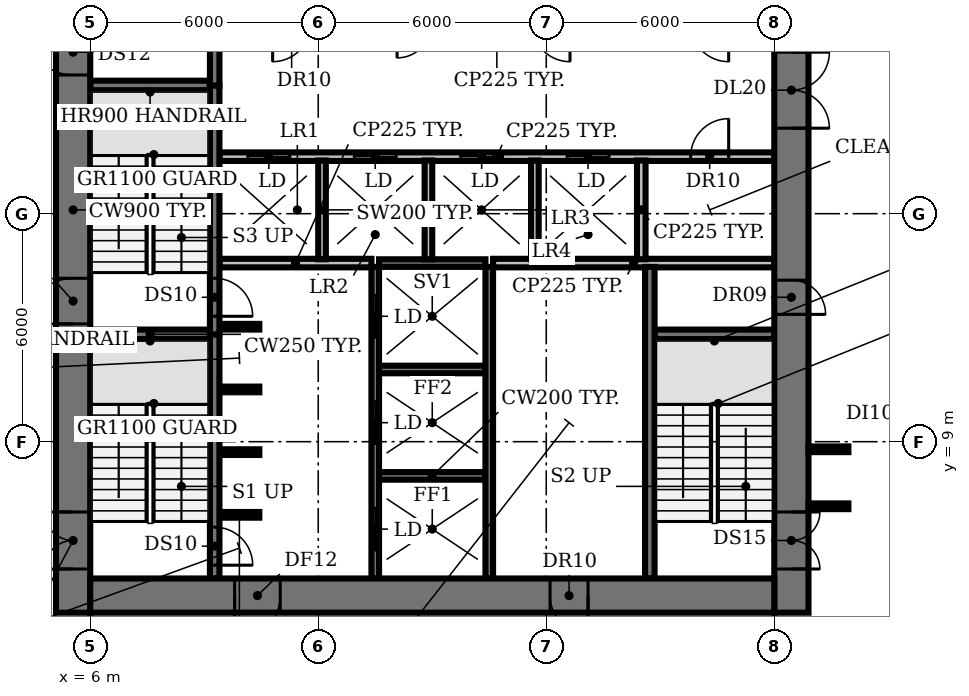
"""IFC4 building model, lengths in metres.
Left out: names, types, materials, properties, quantities, classifications, styles, units other than length and angle.
Written with IfcOpenShell. Run it as: python <this file> out.ifc"""

import sys

from ifc_helpers import new_model, si_unit, direction, frame, frame_2d, origin, place, context, subcontext, project, spatial, rectangle, extrude, element, fill, save


model = new_model("IFC4")
c1 = context("Model", 3, precision=1e-05, world=origin(), true_north=direction((0.0, 1.0)))
c2 = subcontext(c1, "Body", "Model", "MODEL_VIEW")
j1 = project(units=[si_unit("LENGTHUNIT", "METRE"), si_unit("PLANEANGLEUNIT", "RADIAN")], contexts=[c1])
p1 = place(None, origin())
s1 = spatial("IfcSite", under=j1, at=p1, CompositionType="ELEMENT")
p2 = place(p1, origin())
s2 = spatial("IfcBuilding", under=s1, at=p2, CompositionType="ELEMENT")
p3 = place(p2, frame((0.0, 0.0, 50.0)))
s3 = spatial("IfcBuildingStorey", under=s2, at=p3, CompositionType="ELEMENT", Elevation=50.0)
p4 = place(p3, frame((9.4, 7.075, 0.0), z_axis=(0.0, 0.0, 1.0), x_axis=(1.0, 0.0, 0.0)))
e1 = element("IfcWall", 1, at=p4, inside=s3, PredefinedType="SHEAR", context=c2, shape_type="SweptSolid", body=[
    extrude(rectangle(XDim=1.05, YDim=0.15, at=frame_2d((0.525, 0.0))), origin(), (0.0, 0.0, 1.0), 3.85),
])
p5 = place(p3, frame((13.6, 8.1, 0.0), z_axis=(0.0, 0.0, 1.0), x_axis=(1.0, 0.0, 0.0)))
e2 = element("IfcWall", 2, at=p5, inside=s3, PredefinedType="SHEAR", context=c2, shape_type="SweptSolid", body=[
    extrude(rectangle(XDim=2.8, YDim=0.2, at=frame_2d((1.4, 0.0))), origin(), (0.0, 0.0, 1.0), 3.85),
])
for number, where, z_axis, x_axis in (
    (3, (9.4, 8.725, 0.0), (0.0, 0.0, 1.0), (1.0, 0.0, 0.0)),
    (4, (9.4, 10.375, 0.0), (0.0, 0.0, 1.0), (1.0, 0.0, 0.0)),
):
    element("IfcWall", number, at=place(p3, frame(where, z_axis=z_axis, x_axis=x_axis)), inside=s3, PredefinedType="SHEAR", context=c2, shape_type="SweptSolid", body=[
        extrude(rectangle(XDim=1.05, YDim=0.15, at=frame_2d((0.525, 0.0))), origin(), (0.0, 0.0, 1.0), 3.85),
    ])
p6 = place(p3, frame((13.6, 10.9, 0.0), z_axis=(0.0, 0.0, 1.0), x_axis=(1.0, 0.0, 0.0)))
e5 = element("IfcWall", 5, at=p6, inside=s3, PredefinedType="SHEAR", context=c2, shape_type="SweptSolid", body=[
    extrude(rectangle(XDim=2.8, YDim=0.2, at=frame_2d((1.4, 0.0))), origin(), (0.0, 0.0, 1.0), 3.85),
])
for number, where, z_axis, x_axis in (
    (6, (6.0, 11.825, 0.0), (0.0, 0.0, 1.0), (1.0, 0.0, 0.0)),
    (7, (20.85, 11.825, 0.0), (0.0, 0.0, 1.0), (1.0, 0.0, 0.0)),
):
    element("IfcWall", number, at=place(p3, frame(where, z_axis=z_axis, x_axis=x_axis)), inside=s3, PredefinedType="SHEAR", context=c2, shape_type="SweptSolid", body=[
        extrude(rectangle(XDim=3.15, YDim=0.25, at=frame_2d((1.575, 0.0))), origin(), (0.0, 0.0, 1.0), 3.85),
    ])
p7 = place(p3, frame((9.4, 12.025, 0.0), z_axis=(0.0, 0.0, 1.0), x_axis=(1.0, 0.0, 0.0)))
e8 = element("IfcWall", 8, at=p7, inside=s3, PredefinedType="SHEAR", context=c2, shape_type="SweptSolid", body=[
    extrude(rectangle(XDim=1.05, YDim=0.15, at=frame_2d((0.525, 0.0))), origin(), (0.0, 0.0, 1.0), 3.85),
])
p8 = place(p3, frame((9.4, 13.7, 0.0), z_axis=(0.0, 0.0, 1.0), x_axis=(1.0, 0.0, 0.0)))
e9 = element("IfcWall", 9, at=p8, inside=s3, PredefinedType="PARTITIONING", context=c2, shape_type="SweptSolid", body=[
    extrude(rectangle(XDim=4.0, YDim=0.225, at=frame_2d((2.0, 0.0))), origin(), (0.0, 0.0, 1.0), 3.85),
])
p9 = place(p3, frame((13.6, 13.7, 0.0), z_axis=(0.0, 0.0, 1.0), x_axis=(1.0, 0.0, 0.0)))
e10 = element("IfcWall", 10, at=p9, inside=s3, PredefinedType="SHEAR", context=c2, shape_type="SweptSolid", body=[
    extrude(rectangle(XDim=2.8, YDim=0.2, at=frame_2d((1.4, 0.0))), origin(), (0.0, 0.0, 1.0), 3.85),
])
p10 = place(p3, frame((16.6, 13.7, 0.0), z_axis=(0.0, 0.0, 1.0), x_axis=(1.0, 0.0, 0.0)))
e11 = element("IfcWall", 11, at=p10, inside=s3, PredefinedType="PARTITIONING", context=c2, shape_type="SweptSolid", body=[
    extrude(rectangle(XDim=7.4, YDim=0.225, at=frame_2d((3.7, 0.0))), origin(), (0.0, 0.0, 1.0), 3.85),
])
p11 = place(p3, frame((9.4, 16.5, 0.0), z_axis=(0.0, 0.0, 1.0), x_axis=(1.0, 0.0, 0.0)))
e12 = element("IfcWall", 12, at=p11, inside=s3, PredefinedType="PARTITIONING", context=c2, shape_type="SweptSolid", body=[
    extrude(rectangle(XDim=14.6, YDim=0.225, at=frame_2d((7.3, 0.0))), origin(), (0.0, 0.0, 1.0), 3.85),
])
p12 = place(p11, frame((0.75, 0.0, 0.0)))
e13 = element("IfcOpeningElement", 13, at=p12, cuts=e12, PredefinedType="OPENING", context=c2, shape_type="SweptSolid", body=[
    extrude(rectangle(XDim=1.1, YDim=2.1, at=frame_2d((0.55, 1.05))), frame((0.0, 0.123, 0.0), z_axis=(0.0, -1.0, 0.0), x_axis=(1.0, 0.0, 0.0)), (0.0, 0.0, 1.0), 0.245),
])
p13 = place(p11, frame((3.55, 0.0, 0.0)))
e14 = element("IfcOpeningElement", 14, at=p13, cuts=e12, PredefinedType="OPENING", context=c2, shape_type="SweptSolid", body=[
    extrude(rectangle(XDim=1.1, YDim=2.1, at=frame_2d((0.55, 1.05))), frame((0.0, 0.123, 0.0), z_axis=(0.0, -1.0, 0.0), x_axis=(1.0, 0.0, 0.0)), (0.0, 0.0, 1.0), 0.245),
])
p14 = place(p11, frame((6.35, 0.0, 0.0)))
e15 = element("IfcOpeningElement", 15, at=p14, cuts=e12, PredefinedType="OPENING", context=c2, shape_type="SweptSolid", body=[
    extrude(rectangle(XDim=1.1, YDim=2.1, at=frame_2d((0.55, 1.05))), frame((0.0, 0.123, 0.0), z_axis=(0.0, -1.0, 0.0), x_axis=(1.0, 0.0, 0.0)), (0.0, 0.0, 1.0), 0.245),
])
p15 = place(p11, frame((9.15, 0.0, 0.0)))
e16 = element("IfcOpeningElement", 16, at=p15, cuts=e12, PredefinedType="OPENING", context=c2, shape_type="SweptSolid", body=[
    extrude(rectangle(XDim=1.1, YDim=2.1, at=frame_2d((0.55, 1.05))), frame((0.0, 0.123, 0.0), z_axis=(0.0, -1.0, 0.0), x_axis=(1.0, 0.0, 0.0)), (0.0, 0.0, 1.0), 0.245),
])
p16 = place(p11, frame((12.4, 0.0, 0.0)))
e17 = element("IfcOpeningElement", 17, at=p16, cuts=e12, PredefinedType="OPENING", context=c2, shape_type="SweptSolid", body=[
    extrude(rectangle(XDim=1.0, YDim=2.1, at=frame_2d((0.5, 1.05))), frame((0.0, 0.123, 0.0), z_axis=(0.0, -1.0, 0.0), x_axis=(1.0, 0.0, 0.0)), (0.0, 0.0, 1.0), 0.245),
])
p17 = place(p3, frame((6.0, 18.375, 0.0), z_axis=(0.0, 0.0, 1.0), x_axis=(1.0, 0.0, 0.0)))
e18 = element("IfcWall", 18, at=p17, inside=s3, PredefinedType="SHEAR", context=c2, shape_type="SweptSolid", body=[
    extrude(rectangle(XDim=3.15, YDim=0.25, at=frame_2d((1.575, 0.0))), origin(), (0.0, 0.0, 1.0), 3.85),
])
p18 = place(p3, frame((9.275, 11.825, 0.0), z_axis=(0.0, 0.0, 1.0), x_axis=(0.0, -1.0, 0.0)))
e19 = element("IfcWall", 19, at=p18, inside=s3, PredefinedType="SHEAR", context=c2, shape_type="SweptSolid", body=[
    extrude(rectangle(XDim=6.425, YDim=0.25, at=frame_2d((3.212, 0.0))), origin(), (0.0, 0.0, 1.0), 3.85),
])
p19 = place(p18, frame((5.075, 0.0, 0.0)))
e20 = element("IfcOpeningElement", 20, at=p19, cuts=e19, PredefinedType="OPENING", context=c2, shape_type="SweptSolid", body=[
    extrude(rectangle(XDim=1.0, YDim=2.1, at=frame_2d((0.5, 1.05))), frame((0.0, 0.135, 0.0), z_axis=(0.0, -1.0, 0.0), x_axis=(1.0, 0.0, 0.0)), (0.0, 0.0, 1.0), 0.27),
])
p20 = place(p3, frame((9.275, 18.375, 0.0), z_axis=(0.0, 0.0, 1.0), x_axis=(0.0, -1.0, 0.0)))
e21 = element("IfcWall", 21, at=p20, inside=s3, PredefinedType="SHEAR", context=c2, shape_type="SweptSolid", body=[
    extrude(rectangle(XDim=6.55, YDim=0.25, at=frame_2d((3.275, 0.0))), origin(), (0.0, 0.0, 1.0), 3.85),
])
p21 = place(p20, frame((5.075, 0.0, 0.0)))
e22 = element("IfcOpeningElement", 22, at=p21, cuts=e21, PredefinedType="OPENING", context=c2, shape_type="SweptSolid", body=[
    extrude(rectangle(XDim=1.0, YDim=2.1, at=frame_2d((0.5, 1.05))), frame((0.0, 0.135, 0.0), z_axis=(0.0, -1.0, 0.0), x_axis=(1.0, 0.0, 0.0)), (0.0, 0.0, 1.0), 0.27),
])
p22 = place(p3, frame((9.275, 18.375, 0.0), z_axis=(0.0, 0.0, 1.0), x_axis=(0.0, 1.0, 0.0)))
e23 = element("IfcWall", 23, at=p22, inside=s3, PredefinedType="SHEAR", context=c2, shape_type="SweptSolid", body=[
    extrude(rectangle(XDim=6.425, YDim=0.25, at=frame_2d((3.212, 0.0))), origin(), (0.0, 0.0, 1.0), 3.85),
])
p23 = place(p3, frame((12.1, 13.8, 0.0), z_axis=(0.0, 0.0, 1.0), x_axis=(0.0, 1.0, 0.0)))
e24 = element("IfcWall", 24, at=p23, inside=s3, PredefinedType="SOLIDWALL", context=c2, shape_type="SweptSolid", body=[
    extrude(rectangle(XDim=2.6, YDim=0.2, at=frame_2d((1.3, 0.0))), origin(), (0.0, 0.0, 1.0), 3.85),
])
p24 = place(p3, frame((13.5, 5.4, 0.0), z_axis=(0.0, 0.0, 1.0), x_axis=(0.0, 1.0, 0.0)))
e25 = element("IfcWall", 25, at=p24, inside=s3, PredefinedType="SHEAR", context=c2, shape_type="SweptSolid", body=[
    extrude(rectangle(XDim=8.2, YDim=0.2, at=frame_2d((4.1, 0.0))), origin(), (0.0, 0.0, 1.0), 3.85),
])
p25 = place(p24, frame((0.75, 0.0, 0.0)))
e26 = element("IfcOpeningElement", 26, at=p25, cuts=e25, PredefinedType="OPENING", context=c2, shape_type="SweptSolid", body=[
    extrude(rectangle(XDim=1.1, YDim=2.1, at=frame_2d((0.55, 1.05))), frame((0.0, 0.11, 0.0), z_axis=(0.0, -1.0, 0.0), x_axis=(1.0, 0.0, 0.0)), (0.0, 0.0, 1.0), 0.22),
])
p26 = place(p24, frame((3.55, 0.0, 0.0)))
e27 = element("IfcOpeningElement", 27, at=p26, cuts=e25, PredefinedType="OPENING", context=c2, shape_type="SweptSolid", body=[
    extrude(rectangle(XDim=1.1, YDim=2.1, at=frame_2d((0.55, 1.05))), frame((0.0, 0.11, 0.0), z_axis=(0.0, -1.0, 0.0), x_axis=(1.0, 0.0, 0.0)), (0.0, 0.0, 1.0), 0.22),
])
p27 = place(p24, frame((6.35, 0.0, 0.0)))
e28 = element("IfcOpeningElement", 28, at=p27, cuts=e25, PredefinedType="OPENING", context=c2, shape_type="SweptSolid", body=[
    extrude(rectangle(XDim=1.1, YDim=2.1, at=frame_2d((0.55, 1.05))), frame((0.0, 0.11, 0.0), z_axis=(0.0, -1.0, 0.0), x_axis=(1.0, 0.0, 0.0)), (0.0, 0.0, 1.0), 0.22),
])
p28 = place(p3, frame((14.9, 13.8, 0.0), z_axis=(0.0, 0.0, 1.0), x_axis=(0.0, 1.0, 0.0)))
e29 = element("IfcWall", 29, at=p28, inside=s3, PredefinedType="SOLIDWALL", context=c2, shape_type="SweptSolid", body=[
    extrude(rectangle(XDim=2.6, YDim=0.2, at=frame_2d((1.3, 0.0))), origin(), (0.0, 0.0, 1.0), 3.85),
])
p29 = place(p3, frame((16.5, 5.4, 0.0), z_axis=(0.0, 0.0, 1.0), x_axis=(0.0, 1.0, 0.0)))
e30 = element("IfcWall", 30, at=p29, inside=s3, PredefinedType="SHEAR", context=c2, shape_type="SweptSolid", body=[
    extrude(rectangle(XDim=8.2, YDim=0.2, at=frame_2d((4.1, 0.0))), origin(), (0.0, 0.0, 1.0), 3.85),
])
p30 = place(p3, frame((17.7, 13.8, 0.0), z_axis=(0.0, 0.0, 1.0), x_axis=(0.0, 1.0, 0.0)))
e31 = element("IfcWall", 31, at=p30, inside=s3, PredefinedType="SOLIDWALL", context=c2, shape_type="SweptSolid", body=[
    extrude(rectangle(XDim=2.6, YDim=0.2, at=frame_2d((1.3, 0.0))), origin(), (0.0, 0.0, 1.0), 3.85),
])
p31 = place(p3, frame((20.5, 13.8, 0.0), z_axis=(0.0, 0.0, 1.0), x_axis=(0.0, 1.0, 0.0)))
e32 = element("IfcWall", 32, at=p31, inside=s3, PredefinedType="PARTITIONING", context=c2, shape_type="SweptSolid", body=[
    extrude(rectangle(XDim=2.6, YDim=0.225, at=frame_2d((1.3, 0.0))), origin(), (0.0, 0.0, 1.0), 3.85),
])
p32 = place(p3, frame((20.725, 5.4, 0.0), z_axis=(0.0, 0.0, 1.0), x_axis=(0.0, 1.0, 0.0)))
e33 = element("IfcWall", 33, at=p32, inside=s3, PredefinedType="SHEAR", context=c2, shape_type="SweptSolid", body=[
    extrude(rectangle(XDim=8.2, YDim=0.25, at=frame_2d((4.1, 0.0))), origin(), (0.0, 0.0, 1.0), 3.85),
])
p33 = place(p3, frame((5.55, 4.5, 0.0), z_axis=(0.0, 0.0, 1.0), x_axis=(0.0, 1.0, 0.0)))
e34 = element("IfcWall", 34, at=p33, inside=s3, PredefinedType="SHEAR", context=c2, shape_type="SweptSolid", body=[
    extrude(rectangle(XDim=21.2, YDim=0.9, at=frame_2d((10.6, 0.0))), origin(), (0.0, 0.0, 1.0), 3.85),
])
p34 = place(p33, frame((1.15, 0.0, 0.0)))
e35 = element("IfcOpeningElement", 35, at=p34, cuts=e34, PredefinedType="OPENING", context=c2, shape_type="SweptSolid", body=[
    extrude(rectangle(XDim=1.5, YDim=2.1, at=frame_2d((0.75, 1.05))), frame((0.0, 0.46, 0.0), z_axis=(0.0, -1.0, 0.0), x_axis=(1.0, 0.0, 0.0)), (0.0, 0.0, 1.0), 0.92),
])
p35 = place(p33, frame((7.6, 0.0, 0.0)))
e36 = element("IfcOpeningElement", 36, at=p35, cuts=e34, PredefinedType="OPENING", context=c2, shape_type="SweptSolid", body=[
    extrude(rectangle(XDim=1.2, YDim=2.1, at=frame_2d((0.6, 1.05))), frame((0.0, 0.46, 0.0), z_axis=(0.0, -1.0, 0.0), x_axis=(1.0, 0.0, 0.0)), (0.0, 0.0, 1.0), 0.92),
])
p36 = place(p33, frame((14.15, 0.0, 0.0)))
e37 = element("IfcOpeningElement", 37, at=p36, cuts=e34, PredefinedType="OPENING", context=c2, shape_type="SweptSolid", body=[
    extrude(rectangle(XDim=1.2, YDim=2.1, at=frame_2d((0.6, 1.05))), frame((0.0, 0.46, 0.0), z_axis=(0.0, -1.0, 0.0), x_axis=(1.0, 0.0, 0.0)), (0.0, 0.0, 1.0), 0.92),
])
p37 = place(p3, frame((24.45, 25.7, 0.0), z_axis=(0.0, 0.0, 1.0), x_axis=(0.0, -1.0, 0.0)))
e38 = element("IfcWall", 38, at=p37, inside=s3, PredefinedType="SHEAR", context=c2, shape_type="SweptSolid", body=[
    extrude(rectangle(XDim=21.2, YDim=0.9, at=frame_2d((10.6, 0.0))), origin(), (0.0, 0.0, 1.0), 3.85),
])
p38 = place(p37, frame((18.55, 0.0, 0.0)))
e39 = element("IfcOpeningElement", 39, at=p38, cuts=e38, PredefinedType="OPENING", context=c2, shape_type="SweptSolid", body=[
    extrude(rectangle(XDim=1.5, YDim=2.1, at=frame_2d((0.75, 1.05))), frame((0.0, 0.46, 0.0), z_axis=(0.0, -1.0, 0.0), x_axis=(1.0, 0.0, 0.0)), (0.0, 0.0, 1.0), 0.92),
])
p39 = place(p37, frame((12.45, 0.0, 0.0)))
e40 = element("IfcOpeningElement", 40, at=p39, cuts=e38, PredefinedType="OPENING", context=c2, shape_type="SweptSolid", body=[
    extrude(rectangle(XDim=0.9, YDim=2.1, at=frame_2d((0.45, 1.05))), frame((0.0, 0.46, 0.0), z_axis=(0.0, -1.0, 0.0), x_axis=(1.0, 0.0, 0.0)), (0.0, 0.0, 1.0), 0.92),
])
p40 = place(p37, frame((6.45, 0.0, 0.0)))
e41 = element("IfcOpeningElement", 41, at=p40, cuts=e38, PredefinedType="OPENING", context=c2, shape_type="SweptSolid", body=[
    extrude(rectangle(XDim=2.0, YDim=2.1, at=frame_2d((1.0, 1.05))), frame((0.0, 0.46, 0.0), z_axis=(0.0, -1.0, 0.0), x_axis=(1.0, 0.0, 0.0)), (0.0, 0.0, 1.0), 0.92),
])
p41 = place(p3, frame((24.0, 4.95, 0.0), z_axis=(0.0, 0.0, 1.0), x_axis=(-1.0, 0.0, 0.0)))
e42 = element("IfcWall", 42, at=p41, inside=s3, PredefinedType="SHEAR", context=c2, shape_type="SweptSolid", body=[
    extrude(rectangle(XDim=18.0, YDim=0.9, at=frame_2d((9.0, 0.0))), origin(), (0.0, 0.0, 1.0), 3.85),
])
p42 = place(p41, frame((13.0, 0.0, 0.0)))
e43 = element("IfcOpeningElement", 43, at=p42, cuts=e42, PredefinedType="OPENING", context=c2, shape_type="SweptSolid", body=[
    extrude(rectangle(XDim=1.2, YDim=2.1, at=frame_2d((0.6, 1.05))), frame((0.0, 0.46, 0.0), z_axis=(0.0, -1.0, 0.0), x_axis=(1.0, 0.0, 0.0)), (0.0, 0.0, 1.0), 0.92),
])
p43 = place(p41, frame((4.9, 0.0, 0.0)))
e44 = element("IfcOpeningElement", 44, at=p43, cuts=e42, PredefinedType="OPENING", context=c2, shape_type="SweptSolid", body=[
    extrude(rectangle(XDim=1.0, YDim=2.1, at=frame_2d((0.5, 1.05))), frame((0.0, 0.46, 0.0), z_axis=(0.0, -1.0, 0.0), x_axis=(1.0, 0.0, 0.0)), (0.0, 0.0, 1.0), 0.92),
])
for number, where, z_axis, x_axis in (
    (45, (24.9, 7.3, 0.0), (0.0, 0.0, 1.0), (1.0, 0.0, 0.0)),
    (46, (24.9, 8.8, 0.0), (0.0, 0.0, 1.0), (1.0, 0.0, 0.0)),
):
    element("IfcWall", number, at=place(p3, frame(where, z_axis=z_axis, x_axis=x_axis)), inside=s3, PredefinedType="PARTITIONING", context=c2, shape_type="SweptSolid", body=[
        extrude(rectangle(XDim=1.05, YDim=0.15, at=frame_2d((0.525, 0.0))), origin(), (0.0, 0.0, 1.0), 2.83),
    ])
p44 = place(p12, origin())
e47 = element("IfcDoor", 47, at=p44, inside=s3, OperationType="DOUBLE_DOOR_SLIDING", PredefinedType="DOOR", context=c2, shape_type="SweptSolid", body=[
    extrude(rectangle(XDim=1.1, YDim=2.1, at=frame_2d((0.55, 1.05))), frame((0.0, 0.025, 0.0), z_axis=(0.0, -1.0, 0.0), x_axis=(1.0, 0.0, 0.0)), (0.0, 0.0, 1.0), 0.05),
])
fill(e13, e47)
p45 = place(p13, origin())
e48 = element("IfcDoor", 48, at=p45, inside=s3, OperationType="DOUBLE_DOOR_SLIDING", PredefinedType="DOOR", context=c2, shape_type="SweptSolid", body=[
    extrude(rectangle(XDim=1.1, YDim=2.1, at=frame_2d((0.55, 1.05))), frame((0.0, 0.025, 0.0), z_axis=(0.0, -1.0, 0.0), x_axis=(1.0, 0.0, 0.0)), (0.0, 0.0, 1.0), 0.05),
])
fill(e14, e48)
p46 = place(p14, origin())
e49 = element("IfcDoor", 49, at=p46, inside=s3, OperationType="DOUBLE_DOOR_SLIDING", PredefinedType="DOOR", context=c2, shape_type="SweptSolid", body=[
    extrude(rectangle(XDim=1.1, YDim=2.1, at=frame_2d((0.55, 1.05))), frame((0.0, 0.025, 0.0), z_axis=(0.0, -1.0, 0.0), x_axis=(1.0, 0.0, 0.0)), (0.0, 0.0, 1.0), 0.05),
])
fill(e15, e49)
p47 = place(p15, origin())
e50 = element("IfcDoor", 50, at=p47, inside=s3, OperationType="DOUBLE_DOOR_SLIDING", PredefinedType="DOOR", context=c2, shape_type="SweptSolid", body=[
    extrude(rectangle(XDim=1.1, YDim=2.1, at=frame_2d((0.55, 1.05))), frame((0.0, 0.025, 0.0), z_axis=(0.0, -1.0, 0.0), x_axis=(1.0, 0.0, 0.0)), (0.0, 0.0, 1.0), 0.05),
])
fill(e16, e50)
p48 = place(p16, origin())
e51 = element("IfcDoor", 51, at=p48, inside=s3, OperationType="SINGLE_SWING_RIGHT", PredefinedType="DOOR", context=c2, shape_type="SweptSolid", body=[
    extrude(rectangle(XDim=1.0, YDim=2.1, at=frame_2d((0.5, 1.05))), frame((0.0, 0.025, 0.0), z_axis=(0.0, -1.0, 0.0), x_axis=(1.0, 0.0, 0.0)), (0.0, 0.0, 1.0), 0.05),
])
fill(e17, e51)
p49 = place(p19, origin())
e52 = element("IfcDoor", 52, at=p49, inside=s3, OperationType="SINGLE_SWING_RIGHT", PredefinedType="DOOR", context=c2, shape_type="SweptSolid", body=[
    extrude(rectangle(XDim=1.0, YDim=2.1, at=frame_2d((0.5, 1.05))), frame((0.0, 0.025, 0.0), z_axis=(0.0, -1.0, 0.0), x_axis=(1.0, 0.0, 0.0)), (0.0, 0.0, 1.0), 0.05),
])
fill(e20, e52)
p50 = place(p21, origin())
e53 = element("IfcDoor", 53, at=p50, inside=s3, OperationType="SINGLE_SWING_RIGHT", PredefinedType="DOOR", context=c2, shape_type="SweptSolid", body=[
    extrude(rectangle(XDim=1.0, YDim=2.1, at=frame_2d((0.5, 1.05))), frame((0.0, 0.025, 0.0), z_axis=(0.0, -1.0, 0.0), x_axis=(1.0, 0.0, 0.0)), (0.0, 0.0, 1.0), 0.05),
])
fill(e22, e53)
p51 = place(p25, origin())
e54 = element("IfcDoor", 54, at=p51, inside=s3, OperationType="DOUBLE_DOOR_SLIDING", PredefinedType="DOOR", context=c2, shape_type="SweptSolid", body=[
    extrude(rectangle(XDim=1.1, YDim=2.1, at=frame_2d((0.55, 1.05))), frame((0.0, 0.025, 0.0), z_axis=(0.0, -1.0, 0.0), x_axis=(1.0, 0.0, 0.0)), (0.0, 0.0, 1.0), 0.05),
])
fill(e26, e54)
p52 = place(p26, origin())
e55 = element("IfcDoor", 55, at=p52, inside=s3, OperationType="DOUBLE_DOOR_SLIDING", PredefinedType="DOOR", context=c2, shape_type="SweptSolid", body=[
    extrude(rectangle(XDim=1.1, YDim=2.1, at=frame_2d((0.55, 1.05))), frame((0.0, 0.025, 0.0), z_axis=(0.0, -1.0, 0.0), x_axis=(1.0, 0.0, 0.0)), (0.0, 0.0, 1.0), 0.05),
])
fill(e27, e55)
p53 = place(p27, origin())
e56 = element("IfcDoor", 56, at=p53, inside=s3, OperationType="DOUBLE_DOOR_SLIDING", PredefinedType="DOOR", context=c2, shape_type="SweptSolid", body=[
    extrude(rectangle(XDim=1.1, YDim=2.1, at=frame_2d((0.55, 1.05))), frame((0.0, 0.025, 0.0), z_axis=(0.0, -1.0, 0.0), x_axis=(1.0, 0.0, 0.0)), (0.0, 0.0, 1.0), 0.05),
])
fill(e28, e56)
p54 = place(p34, origin())
e57 = element("IfcDoor", 57, at=p54, inside=s3, OperationType="DOUBLE_DOOR_SINGLE_SWING", PredefinedType="DOOR", context=c2, shape_type="SweptSolid", body=[
    extrude(rectangle(XDim=1.5, YDim=2.1, at=frame_2d((0.75, 1.05))), frame((0.0, 0.025, 0.0), z_axis=(0.0, -1.0, 0.0), x_axis=(1.0, 0.0, 0.0)), (0.0, 0.0, 1.0), 0.05),
])
fill(e35, e57)
p55 = place(p35, origin())
e58 = element("IfcDoor", 58, at=p55, inside=s3, OperationType="SINGLE_SWING_LEFT", PredefinedType="DOOR", context=c2, shape_type="SweptSolid", body=[
    extrude(rectangle(XDim=1.2, YDim=2.1, at=frame_2d((0.6, 1.05))), frame((0.0, 0.025, 0.0), z_axis=(0.0, -1.0, 0.0), x_axis=(1.0, 0.0, 0.0)), (0.0, 0.0, 1.0), 0.05),
])
fill(e36, e58)
p56 = place(p36, origin())
e59 = element("IfcDoor", 59, at=p56, inside=s3, OperationType="SINGLE_SWING_RIGHT", PredefinedType="DOOR", context=c2, shape_type="SweptSolid", body=[
    extrude(rectangle(XDim=1.2, YDim=2.1, at=frame_2d((0.6, 1.05))), frame((0.0, 0.025, 0.0), z_axis=(0.0, -1.0, 0.0), x_axis=(1.0, 0.0, 0.0)), (0.0, 0.0, 1.0), 0.05),
])
fill(e37, e59)
p57 = place(p38, origin())
e60 = element("IfcDoor", 60, at=p57, inside=s3, OperationType="DOUBLE_DOOR_SINGLE_SWING", PredefinedType="DOOR", context=c2, shape_type="SweptSolid", body=[
    extrude(rectangle(XDim=1.5, YDim=2.1, at=frame_2d((0.75, 1.05))), frame((0.0, 0.025, 0.0), z_axis=(0.0, -1.0, 0.0), x_axis=(1.0, 0.0, 0.0)), (0.0, 0.0, 1.0), 0.05),
])
fill(e39, e60)
p58 = place(p39, origin())
e61 = element("IfcDoor", 61, at=p58, inside=s3, OperationType="SINGLE_SWING_RIGHT", PredefinedType="DOOR", context=c2, shape_type="SweptSolid", body=[
    extrude(rectangle(XDim=0.9, YDim=2.1, at=frame_2d((0.45, 1.05))), frame((0.0, -0.39, 0.0), z_axis=(0.0, -1.0, 0.0), x_axis=(1.0, 0.0, 0.0)), (0.0, 0.0, 1.0), 0.05),
])
fill(e40, e61)
p59 = place(p40, origin())
e62 = element("IfcDoor", 62, at=p59, inside=s3, OperationType="DOUBLE_DOOR_SINGLE_SWING", PredefinedType="DOOR", context=c2, shape_type="SweptSolid", body=[
    extrude(rectangle(XDim=2.0, YDim=2.1, at=frame_2d((1.0, 1.05))), frame((0.0, 0.025, 0.0), z_axis=(0.0, -1.0, 0.0), x_axis=(1.0, 0.0, 0.0)), (0.0, 0.0, 1.0), 0.05),
])
fill(e41, e62)
p60 = place(p42, origin())
e63 = element("IfcDoor", 63, at=p60, inside=s3, OperationType="SINGLE_SWING_RIGHT", PredefinedType="DOOR", context=c2, shape_type="SweptSolid", body=[
    extrude(rectangle(XDim=1.2, YDim=2.1, at=frame_2d((0.6, 1.05))), frame((0.0, 0.025, 0.0), z_axis=(0.0, -1.0, 0.0), x_axis=(1.0, 0.0, 0.0)), (0.0, 0.0, 1.0), 0.05),
])
fill(e43, e63)
p61 = place(p43, origin())
e64 = element("IfcDoor", 64, at=p61, inside=s3, OperationType="SINGLE_SWING_LEFT", PredefinedType="DOOR", context=c2, shape_type="SweptSolid", body=[
    extrude(rectangle(XDim=1.0, YDim=2.1, at=frame_2d((0.5, 1.05))), frame((0.0, -0.39, 0.0), z_axis=(0.0, -1.0, 0.0), x_axis=(1.0, 0.0, 0.0)), (0.0, 0.0, 1.0), 0.05),
])
fill(e44, e64)
save(model, sys.argv[1])
